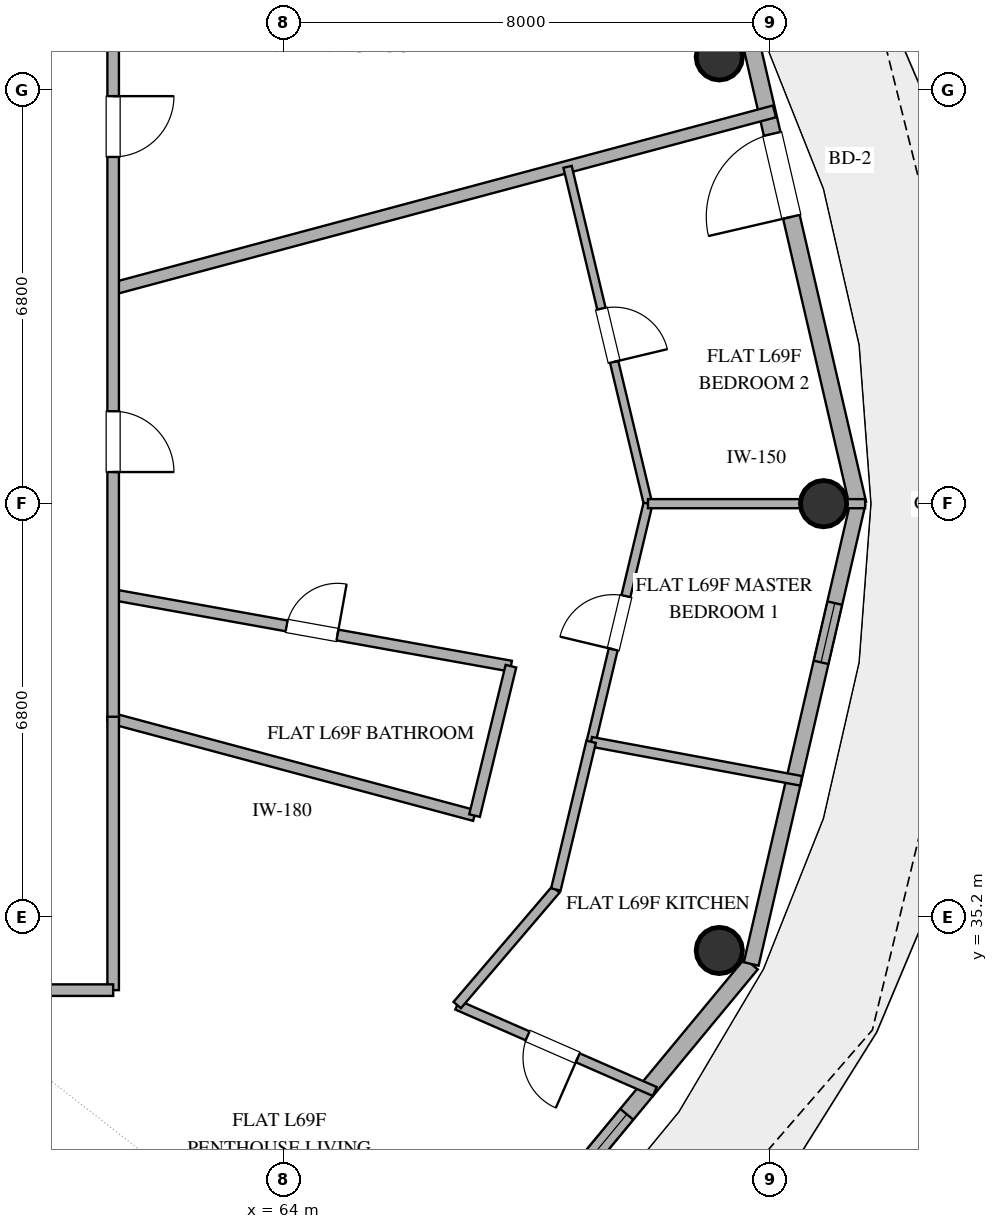
"""IFC4 building model, lengths in metres.
Left out: names, types, materials, properties, quantities, classifications, styles, units other than length and angle.
Written with IfcOpenShell. Run it as: python <this file> out.ifc"""

import sys

from ifc_helpers import new_model, si_unit, direction, frame, frame_2d, origin, origin_2d, place, context, subcontext, project, spatial, rectangle, hollow_circle, extrude, element, fill, save


model = new_model("IFC4")
c1 = context("Model", 3, precision=1e-05, world=origin(), true_north=direction((0.0, 1.0)))
c2 = subcontext(c1, "Body", "Model", "MODEL_VIEW")
j1 = project(units=[si_unit("LENGTHUNIT", "METRE"), si_unit("PLANEANGLEUNIT", "RADIAN")], contexts=[c1])
p1 = place(None, origin())
s1 = spatial("IfcSite", under=j1, at=p1, CompositionType="ELEMENT")
p2 = place(p1, origin())
s2 = spatial("IfcBuilding", under=s1, at=p2, CompositionType="ELEMENT")
p3 = place(p2, frame((0.0, 0.0, 269.4)))
s3 = spatial("IfcBuildingStorey", under=s2, at=p3, CompositionType="ELEMENT", Elevation=269.4)
for number, where, z_axis, x_axis in (
    (1, (72.883, 42.0, 0.0), (0.0, 0.0, 1.0), (1.0, 0.0, 0.0)),
    (2, (71.169, 49.347, 0.0), (0.0, 0.0, 1.0), (1.0, 0.0, 0.0)),
    (3, (71.169, 34.653, 0.0), (0.0, 0.0, 1.0), (1.0, 0.0, 0.0)),
):
    element("IfcColumn", number, at=place(p3, frame(where, z_axis=z_axis, x_axis=x_axis)), inside=s3, PredefinedType="COLUMN", context=c2, shape_type="SweptSolid", body=[
        extrude(hollow_circle(Radius=0.381, WallThickness=0.025, at=origin_2d()), origin(), (0.0, 0.0, 1.0), 3.37),
    ])
p4 = place(p3, frame((73.447, 42.0, 0.0), z_axis=(0.0, 0.0, 1.0), x_axis=(-0.225635078214, 0.974211892495, 0.0)))
e4 = element("IfcWall", 4, at=p4, inside=s3, PredefinedType="SOLIDWALL", context=c2, shape_type="SweptSolid", body=[
    extrude(rectangle(XDim=7.77, YDim=0.28, at=frame_2d((3.885, 0.0))), origin(), (0.0, 0.0, 1.0), 3.37),
])
p5 = place(p4, frame((4.842, 0.0, 0.0)))
e5 = element("IfcOpeningElement", 5, at=p5, cuts=e4, PredefinedType="OPENING", context=c2, shape_type="SweptSolid", body=[
    extrude(rectangle(XDim=1.4, YDim=2.2, at=frame_2d((0.7, 1.1))), frame((0.0, 0.15, 0.0), z_axis=(0.0, -1.0, 0.0), x_axis=(1.0, 0.0, 0.0)), (0.0, 0.0, 1.0), 0.3),
])
p6 = place(p3, frame((66.383, 28.013, 0.0), z_axis=(0.0, 0.0, 1.0), x_axis=(0.63761509934, 0.770355103243, 0.0)))
e6 = element("IfcWall", 6, at=p6, inside=s3, PredefinedType="SOLIDWALL", context=c2, shape_type="SweptSolid", body=[
    extrude(rectangle(XDim=8.33, YDim=0.28, at=frame_2d((4.165, 0.0))), origin(), (0.0, 0.0, 1.0), 3.37),
])
p7 = place(p6, frame((1.789, 0.0, 0.85)))
e7 = element("IfcOpeningElement", 7, at=p7, cuts=e6, PredefinedType="OPENING", context=c2, shape_type="SweptSolid", body=[
    extrude(rectangle(XDim=1.5, YDim=1.8, at=frame_2d((0.75, 0.9))), frame((0.0, 0.15, 0.0), z_axis=(0.0, -1.0, 0.0), x_axis=(1.0, 0.0, 0.0)), (0.0, 0.0, 1.0), 0.3),
])
p8 = place(p6, frame((3.621, 0.0, 0.85)))
e8 = element("IfcOpeningElement", 8, at=p8, cuts=e6, PredefinedType="OPENING", context=c2, shape_type="SweptSolid", body=[
    extrude(rectangle(XDim=1.5, YDim=1.8, at=frame_2d((0.75, 0.9))), frame((0.0, 0.15, 0.0), z_axis=(0.0, -1.0, 0.0), x_axis=(1.0, 0.0, 0.0)), (0.0, 0.0, 1.0), 0.3),
])
p9 = place(p3, frame((71.694, 34.43, 0.0), z_axis=(0.0, 0.0, 1.0), x_axis=(0.225635078214, 0.974211892495, 0.0)))
e9 = element("IfcWall", 9, at=p9, inside=s3, PredefinedType="SOLIDWALL", context=c2, shape_type="SweptSolid", body=[
    extrude(rectangle(XDim=7.77, YDim=0.25, at=frame_2d((3.885, 0.0))), origin(), (0.0, 0.0, 1.0), 3.37),
])
p10 = place(p9, frame((5.091, 0.0, 1.42)))
e10 = element("IfcOpeningElement", 10, at=p10, cuts=e9, PredefinedType="OPENING", context=c2, shape_type="SweptSolid", body=[
    extrude(rectangle(XDim=1.0, YDim=1.05, at=frame_2d((0.5, 0.525))), frame((0.0, 0.135, 0.0), z_axis=(0.0, -1.0, 0.0), x_axis=(1.0, 0.0, 0.0)), (0.0, 0.0, 1.0), 0.27),
])
p11 = place(p3, frame((63.561, 26.439, 0.0), z_axis=(0.0, 0.0, 1.0), x_axis=(-0.707106781187, 0.707106781187, 0.0)))
e11 = element("IfcWall", 11, at=p11, inside=s3, PredefinedType="PARTITIONING", context=c2, shape_type="SweptSolid", body=[
    extrude(rectangle(XDim=12.389, YDim=0.2, at=frame_2d((6.195, 0.0))), origin(), (0.0, 0.0, 1.0), 2.73),
])
p12 = place(p3, frame((72.076, 48.451, 0.0), z_axis=(0.0, 0.0, 1.0), x_axis=(-0.965923661364, -0.258827124578, 0.0)))
e12 = element("IfcWall", 12, at=p12, inside=s3, PredefinedType="PARTITIONING", context=c2, shape_type="SweptSolid", body=[
    extrude(rectangle(XDim=11.26, YDim=0.2, at=frame_2d((5.63, 0.0))), origin(), (0.0, 0.0, 1.0), 2.73),
])
p13 = place(p3, frame((61.2, 40.503, 0.0), z_axis=(0.0, 0.0, 1.0), x_axis=(0.984255481107, -0.176751656034, 0.0)))
e13 = element("IfcWall", 13, at=p13, inside=s3, PredefinedType="PLUMBINGWALL", context=c2, shape_type="SweptSolid", body=[
    extrude(rectangle(XDim=6.647, YDim=0.18, at=frame_2d((3.323, 0.0))), origin(), (0.0, 0.0, 1.0), 2.73),
])
p14 = place(p13, frame((2.898, 0.0, 0.0)))
e14 = element("IfcOpeningElement", 14, at=p14, cuts=e13, PredefinedType="OPENING", context=c2, shape_type="SweptSolid", body=[
    extrude(rectangle(XDim=0.85, YDim=2.1, at=frame_2d((0.425, 1.05))), frame((0.0, 0.1, 0.0), z_axis=(0.0, -1.0, 0.0), x_axis=(1.0, 0.0, 0.0)), (0.0, 0.0, 1.0), 0.2),
])
p15 = place(p3, frame((67.144, 36.871, 0.0), z_axis=(0.0, 0.0, 1.0), x_axis=(-0.965930696626, 0.258800868073, 0.0)))
e15 = element("IfcWall", 15, at=p15, inside=s3, PredefinedType="PLUMBINGWALL", context=c2, shape_type="SweptSolid", body=[
    extrude(rectangle(XDim=6.154, YDim=0.18, at=frame_2d((3.077, 0.0))), origin(), (0.0, 0.0, 1.0), 2.73),
])
p16 = place(p3, frame((68.673, 47.539, 0.0), z_axis=(0.0, 0.0, 1.0), x_axis=(0.232304342064, -0.972643147644, 0.0)))
e16 = element("IfcWall", 16, at=p16, inside=s3, PredefinedType="PARTITIONING", context=c2, shape_type="SweptSolid", body=[
    extrude(rectangle(XDim=5.695, YDim=0.14, at=frame_2d((2.848, 0.0))), origin(), (0.0, 0.0, 1.0), 2.73),
])
p17 = place(p16, frame((2.398, 0.0, 0.0)))
e17 = element("IfcOpeningElement", 17, at=p17, cuts=e16, PredefinedType="OPENING", context=c2, shape_type="SweptSolid", body=[
    extrude(rectangle(XDim=0.9, YDim=2.1, at=frame_2d((0.45, 1.05))), frame((0.0, 0.08, 0.0), z_axis=(0.0, -1.0, 0.0), x_axis=(1.0, 0.0, 0.0)), (0.0, 0.0, 1.0), 0.16),
])
p18 = place(p3, frame((61.2, 50.9, 0.0), z_axis=(0.0, 0.0, 1.0), x_axis=(0.0, -1.0, 0.0)))
e18 = element("IfcWall", 18, at=p18, inside=s3, PredefinedType="PARTITIONING", context=c2, shape_type="SweptSolid", body=[
    extrude(rectangle(XDim=12.47, YDim=0.19, at=frame_2d((6.235, 0.0))), origin(), (0.0, 0.0, 1.0), 2.73),
])
p19 = place(p18, frame((2.198, 0.0, 0.0)))
e19 = element("IfcOpeningElement", 19, at=p19, cuts=e18, PredefinedType="OPENING", context=c2, shape_type="SweptSolid", body=[
    extrude(rectangle(XDim=1.0, YDim=2.2, at=frame_2d((0.5, 1.1))), frame((0.0, 0.105, 0.0), z_axis=(0.0, -1.0, 0.0), x_axis=(1.0, 0.0, 0.0)), (0.0, 0.0, 1.0), 0.21),
])
p20 = place(p18, frame((7.38, 0.0, 0.0)))
e20 = element("IfcOpeningElement", 20, at=p20, cuts=e18, PredefinedType="OPENING", context=c2, shape_type="SweptSolid", body=[
    extrude(rectangle(XDim=1.0, YDim=2.2, at=frame_2d((0.5, 1.1))), frame((0.0, 0.105, 0.0), z_axis=(0.0, -1.0, 0.0), x_axis=(1.0, 0.0, 0.0)), (0.0, 0.0, 1.0), 0.21),
])
p21 = place(p3, frame((61.2, 38.496, 0.0), z_axis=(0.0, 0.0, 1.0), x_axis=(0.0, -1.0, 0.0)))
e21 = element("IfcWall", 21, at=p21, inside=s3, PredefinedType="PARTITIONING", context=c2, shape_type="SweptSolid", body=[
    extrude(rectangle(XDim=4.496, YDim=0.19, at=frame_2d((2.248, 0.0))), origin(), (0.0, 0.0, 1.0), 2.73),
])
p22 = place(p3, frame((69.061, 38.084, 0.0), z_axis=(0.0, 0.0, 1.0), x_axis=(0.232333768072, 0.972636119118, 0.0)))
e22 = element("IfcWall", 22, at=p22, inside=s3, PredefinedType="PARTITIONING", context=c2, shape_type="SweptSolid", body=[
    extrude(rectangle(XDim=4.026, YDim=0.15, at=frame_2d((2.013, 0.0))), origin(), (0.0, 0.0, 1.0), 2.73),
])
p23 = place(p22, frame((1.563, 0.0, 0.0)))
e23 = element("IfcOpeningElement", 23, at=p23, cuts=e22, PredefinedType="OPENING", context=c2, shape_type="SweptSolid", body=[
    extrude(rectangle(XDim=0.9, YDim=2.1, at=frame_2d((0.45, 1.05))), frame((0.0, 0.085, 0.0), z_axis=(0.0, -1.0, 0.0), x_axis=(1.0, 0.0, 0.0)), (0.0, 0.0, 1.0), 0.17),
])
p24 = place(p3, frame((69.996, 42.0, 0.0), z_axis=(0.0, 0.0, 1.0), x_axis=(1.0, 0.0, 0.0)))
e24 = element("IfcWall", 24, at=p24, inside=s3, PredefinedType="PARTITIONING", context=c2, shape_type="SweptSolid", body=[
    extrude(rectangle(XDim=3.571, YDim=0.15, at=frame_2d((1.785, 0.0))), origin(), (0.0, 0.0, 1.0), 2.73),
])
p25 = place(p3, frame((70.108, 32.333, 0.0), z_axis=(0.0, 0.0, 1.0), x_axis=(-0.916236311754, 0.400638267048, 0.0)))
e25 = element("IfcWall", 25, at=p25, inside=s3, PredefinedType="PLUMBINGWALL", context=c2, shape_type="SweptSolid", body=[
    extrude(rectangle(XDim=3.547, YDim=0.16, at=frame_2d((1.773, 0.0))), origin(), (0.0, 0.0, 1.0), 2.73),
])
p26 = place(p25, frame((1.383, 0.0, 0.0)))
e26 = element("IfcOpeningElement", 26, at=p26, cuts=e25, PredefinedType="OPENING", context=c2, shape_type="SweptSolid", body=[
    extrude(rectangle(XDim=0.9, YDim=2.1, at=frame_2d((0.45, 1.05))), frame((0.0, 0.09, 0.0), z_axis=(0.0, -1.0, 0.0), x_axis=(1.0, 0.0, 0.0)), (0.0, 0.0, 1.0), 0.18),
])
p27 = place(p3, frame((72.514, 37.442, 0.0), z_axis=(0.0, 0.0, 1.0), x_axis=(-0.983150389917, 0.182798552526, 0.0)))
e27 = element("IfcWall", 27, at=p27, inside=s3, PredefinedType="PLUMBINGWALL", context=c2, shape_type="SweptSolid", body=[
    extrude(rectangle(XDim=3.512, YDim=0.16, at=frame_2d((1.756, 0.0))), origin(), (0.0, 0.0, 1.0), 2.73),
])
p28 = place(p3, frame((67.742, 39.328, 0.0), z_axis=(0.0, 0.0, 1.0), x_axis=(-0.236511691524, -0.971628642935, 0.0)))
e28 = element("IfcWall", 28, at=p28, inside=s3, PredefinedType="PLUMBINGWALL", context=c2, shape_type="SweptSolid", body=[
    extrude(rectangle(XDim=2.529, YDim=0.18, at=frame_2d((1.265, 0.0))), origin(), (0.0, 0.0, 1.0), 2.73),
])
p29 = place(p3, frame((66.858, 33.754, 0.0), z_axis=(0.0, 0.0, 1.0), x_axis=(0.649277541607, 0.760551559044, 0.0)))
e29 = element("IfcWall", 29, at=p29, inside=s3, PredefinedType="PLUMBINGWALL", context=c2, shape_type="SweptSolid", body=[
    extrude(rectangle(XDim=2.499, YDim=0.16, at=frame_2d((1.25, 0.0))), origin(), (0.0, 0.0, 1.0), 2.73),
])
p30 = place(p3, frame((68.481, 35.655, 0.0), z_axis=(0.0, 0.0, 1.0), x_axis=(0.232241557879, 0.972658140764, 0.0)))
e30 = element("IfcWall", 30, at=p30, inside=s3, PredefinedType="PLUMBINGWALL", context=c2, shape_type="SweptSolid", body=[
    extrude(rectangle(XDim=2.498, YDim=0.16, at=frame_2d((1.249, 0.0))), origin(), (0.0, 0.0, 1.0), 2.73),
])
p31 = place(p3, frame((61.2, 34.0, 0.0), z_axis=(0.0, 0.0, 1.0), x_axis=(-1.0, 0.0, 0.0)))
e31 = element("IfcWall", 31, at=p31, inside=s3, PredefinedType="PARTITIONING", context=c2, shape_type="SweptSolid", body=[
    extrude(rectangle(XDim=2.2, YDim=0.19, at=frame_2d((1.1, 0.0))), origin(), (0.0, 0.0, 1.0), 2.73),
])
p32 = place(p5, origin())
e32 = element("IfcDoor", 32, at=p32, inside=s3, OperationType="SINGLE_SWING_LEFT", PredefinedType="DOOR", context=c2, shape_type="SweptSolid", body=[
    extrude(rectangle(XDim=1.4, YDim=2.2, at=frame_2d((0.7, 1.1))), frame((0.0, 0.025, 0.0), z_axis=(0.0, -1.0, 0.0), x_axis=(1.0, 0.0, 0.0)), (0.0, 0.0, 1.0), 0.05),
])
fill(e5, e32)
p33 = place(p8, origin())
e33 = element("IfcWindow", 33, at=p33, inside=s3, PartitioningType="SINGLE_PANEL", PredefinedType="WINDOW", context=c2, shape_type="SweptSolid", body=[
    extrude(rectangle(XDim=1.5, YDim=1.8, at=frame_2d((0.75, 0.9))), frame((0.0, 0.03, 0.0), z_axis=(0.0, -1.0, 0.0), x_axis=(1.0, 0.0, 0.0)), (0.0, 0.0, 1.0), 0.06),
])
fill(e8, e33)
p34 = place(p10, origin())
e34 = element("IfcWindow", 34, at=p34, inside=s3, PartitioningType="SINGLE_PANEL", PredefinedType="WINDOW", context=c2, shape_type="SweptSolid", body=[
    extrude(rectangle(XDim=1.0, YDim=1.05, at=frame_2d((0.5, 0.525))), frame((0.0, 0.03, 0.0), z_axis=(0.0, -1.0, 0.0), x_axis=(1.0, 0.0, 0.0)), (0.0, 0.0, 1.0), 0.06),
])
fill(e10, e34)
p35 = place(p14, origin())
e35 = element("IfcDoor", 35, at=p35, inside=s3, OperationType="SINGLE_SWING_RIGHT", PredefinedType="DOOR", context=c2, shape_type="SweptSolid", body=[
    extrude(rectangle(XDim=0.85, YDim=2.1, at=frame_2d((0.425, 1.05))), frame((0.0, 0.025, 0.0), z_axis=(0.0, -1.0, 0.0), x_axis=(1.0, 0.0, 0.0)), (0.0, 0.0, 1.0), 0.05),
])
fill(e14, e35)
p36 = place(p17, origin())
e36 = element("IfcDoor", 36, at=p36, inside=s3, OperationType="SINGLE_SWING_RIGHT", PredefinedType="DOOR", context=c2, shape_type="SweptSolid", body=[
    extrude(rectangle(XDim=0.9, YDim=2.1, at=frame_2d((0.45, 1.05))), frame((0.0, 0.025, 0.0), z_axis=(0.0, -1.0, 0.0), x_axis=(1.0, 0.0, 0.0)), (0.0, 0.0, 1.0), 0.05),
])
fill(e17, e36)
p37 = place(p19, origin())
e37 = element("IfcDoor", 37, at=p37, inside=s3, OperationType="SINGLE_SWING_LEFT", PredefinedType="DOOR", context=c2, shape_type="SweptSolid", body=[
    extrude(rectangle(XDim=1.0, YDim=2.2, at=frame_2d((0.5, 1.1))), frame((0.0, 0.025, 0.0), z_axis=(0.0, -1.0, 0.0), x_axis=(1.0, 0.0, 0.0)), (0.0, 0.0, 1.0), 0.05),
])
fill(e19, e37)
p38 = place(p20, origin())
e38 = element("IfcDoor", 38, at=p38, inside=s3, OperationType="SINGLE_SWING_RIGHT", PredefinedType="DOOR", context=c2, shape_type="SweptSolid", body=[
    extrude(rectangle(XDim=1.0, YDim=2.2, at=frame_2d((0.5, 1.1))), frame((0.0, 0.025, 0.0), z_axis=(0.0, -1.0, 0.0), x_axis=(1.0, 0.0, 0.0)), (0.0, 0.0, 1.0), 0.05),
])
fill(e20, e38)
p39 = place(p23, origin())
e39 = element("IfcDoor", 39, at=p39, inside=s3, OperationType="SINGLE_SWING_LEFT", PredefinedType="DOOR", context=c2, shape_type="SweptSolid", body=[
    extrude(rectangle(XDim=0.9, YDim=2.1, at=frame_2d((0.45, 1.05))), frame((0.0, 0.025, 0.0), z_axis=(0.0, -1.0, 0.0), x_axis=(1.0, 0.0, 0.0)), (0.0, 0.0, 1.0), 0.05),
])
fill(e23, e39)
p40 = place(p26, origin())
e40 = element("IfcDoor", 40, at=p40, inside=s3, OperationType="SINGLE_SWING_LEFT", PredefinedType="DOOR", context=c2, shape_type="SweptSolid", body=[
    extrude(rectangle(XDim=0.9, YDim=2.1, at=frame_2d((0.45, 1.05))), frame((0.0, 0.025, 0.0), z_axis=(0.0, -1.0, 0.0), x_axis=(1.0, 0.0, 0.0)), (0.0, 0.0, 1.0), 0.05),
])
fill(e26, e40)
save(model, sys.argv[1])
